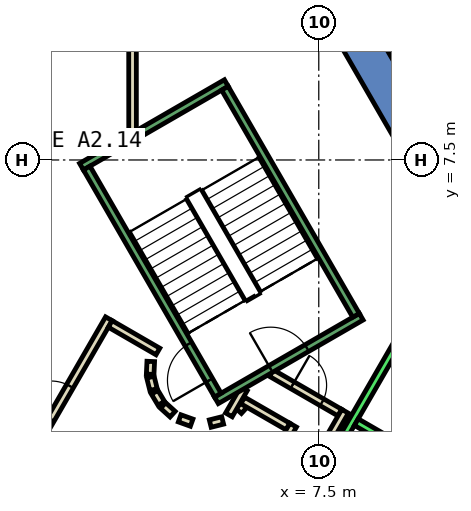
"""IFC4 building model, lengths in metres.
Left out: names, types, materials, properties, quantities, classifications, styles, units other than length and angle.
Written with IfcOpenShell. Run it as: python <this file> out.ifc"""

import sys

from ifc_helpers import new_model, si_unit, direction, frame, frame_2d, origin, place, context, subcontext, project, spatial, polyline, rectangle, outline, extrude, element, fill, save


model = new_model("IFC4")
c1 = context("Model", 3, precision=1e-05, world=origin(), true_north=direction((0.0, 1.0)))
c2 = subcontext(c1, "Body", "Model", "MODEL_VIEW")
j1 = project(units=[si_unit("LENGTHUNIT", "METRE"), si_unit("PLANEANGLEUNIT", "RADIAN")], contexts=[c1])
p1 = place(None, origin())
s1 = spatial("IfcSite", under=j1, at=p1, CompositionType="ELEMENT")
p2 = place(p1, origin())
s2 = spatial("IfcBuilding", under=s1, at=p2, CompositionType="ELEMENT")
p3 = place(p2, frame((0.0, 0.0, 60.2)))
s3 = spatial("IfcBuildingStorey", under=s2, at=p3, CompositionType="ELEMENT", Elevation=60.2)
p4 = place(p3, frame((0.0, 0.0, -0.4)))
e1 = element("IfcWall", 1, at=p4, inside=s3, PredefinedType="SHEAR", context=c2, shape_type="SweptSolid", body=[
    extrude(outline(polyline([(8.517, 11.748), (7.651, 11.248), (12.702, 2.5), (13.856, 2.5), (8.517, 11.748)])), origin(), (0.0, 0.0, 1.0), 4.2),
])
p5 = place(p3, frame((1.88, 7.8, 0.0), z_axis=(0.0, 0.0, 1.0), x_axis=(-1.0, 0.0, 0.0)))
e2 = element("IfcWall", 2, at=p5, inside=s3, PredefinedType="PARTITIONING", context=c2, shape_type="SweptSolid", body=[
    extrude(rectangle(XDim=1.78, YDim=0.2, at=frame_2d((0.89, 0.0))), origin(), (0.0, 0.0, 1.0), 3.8),
])
p6 = place(p3, frame((2.599, 10.7, 0.0), z_axis=(0.0, 0.0, 1.0), x_axis=(0.000393159002, -0.999999922713, 0.0)))
e3 = element("IfcWall", 3, at=p6, inside=s3, PredefinedType="PARTITIONING", context=c2, shape_type="SweptSolid", body=[
    extrude(rectangle(XDim=2.484, YDim=0.2, at=frame_2d((1.242, 0.0))), origin(), (0.0, 0.0, 1.0), 3.8),
])
p7 = place(p3, frame((5.39, 0.898, 0.0), z_axis=(0.0, 0.0, 1.0), x_axis=(0.673828488714, 0.738887791073, 0.0)))
e4 = element("IfcWall", 4, at=p7, inside=s3, PredefinedType="PARTITIONING", context=c2, shape_type="SweptSolid", body=[
    extrude(rectangle(XDim=0.263, YDim=0.2, at=frame_2d((0.131, 0.0))), origin(), (0.0, 0.0, 1.0), 3.8),
])
p8 = place(p3, frame((5.499, 1.172, 0.0), z_axis=(0.0, 0.0, 1.0), x_axis=(0.866333505267, -0.499465972466, 0.0)))
e5 = element("IfcWall", 5, at=p8, inside=s3, PredefinedType="PARTITIONING", context=c2, shape_type="SweptSolid", body=[
    extrude(rectangle(XDim=1.374, YDim=0.2, at=frame_2d((0.687, 0.0))), origin(), (0.0, 0.0, 1.0), 3.8),
])
p9 = place(p3, frame((6.826, 0.522, 0.0), z_axis=(0.0, 0.0, 1.0), x_axis=(-0.500016722714, -0.866015748706, 0.0)))
e6 = element("IfcWall", 6, at=p9, inside=s3, PredefinedType="PARTITIONING", context=c2, shape_type="SweptSolid", body=[
    extrude(rectangle(XDim=1.7, YDim=0.2, at=frame_2d((0.85, 0.0))), origin(), (0.0, 0.0, 1.0), 3.8),
])
p10 = place(p3, frame((6.25, 1.894, 0.0), z_axis=(0.0, 0.0, 1.0), x_axis=(0.866043184279, -0.499969202016, 0.0)))
e7 = element("IfcWall", 7, at=p10, inside=s3, PredefinedType="PARTITIONING", context=c2, shape_type="SweptSolid", body=[
    extrude(rectangle(XDim=2.084, YDim=0.2, at=frame_2d((1.042, 0.0))), origin(), (0.0, 0.0, 1.0), 3.8),
])
p11 = place(p10, frame((0.642, 0.0, 0.0)))
e8 = element("IfcOpeningElement", 8, at=p11, cuts=e7, PredefinedType="OPENING", context=c2, shape_type="SweptSolid", body=[
    extrude(rectangle(XDim=0.9, YDim=2.1, at=frame_2d((0.45, 1.05))), frame((0.0, 0.11, 0.0), z_axis=(0.0, -1.0, 0.0), x_axis=(1.0, 0.0, 0.0)), (0.0, 0.0, 1.0), 0.22),
])
p12 = place(p3, frame((8.192, 0.888, 0.0), z_axis=(0.0, 0.0, 1.0), x_axis=(-0.499940625693, -0.866059680843, 0.0)))
e9 = element("IfcWall", 9, at=p12, inside=s3, PredefinedType="PARTITIONING", context=c2, shape_type="SweptSolid", body=[
    extrude(rectangle(XDim=2.68, YDim=0.2, at=frame_2d((1.34, 0.0))), origin(), (0.0, 0.0, 1.0), 3.8),
])
p13 = place(p3, frame((5.135, 0.793, 0.0), z_axis=(0.0, 0.0, 1.0), x_axis=(0.499526442893, 0.866298639529, 0.0)))
e10 = element("IfcWall", 10, at=p13, inside=s3, PredefinedType="PARTITIONING", context=c2, shape_type="SweptSolid", body=[
    extrude(rectangle(XDim=0.791, YDim=0.2, at=frame_2d((0.396, 0.0))), origin(), (0.0, 0.0, 1.0), 3.8),
])
p14 = place(p3, frame((-0.52, -1.0, 0.0), z_axis=(0.0, 0.0, 1.0), x_axis=(0.50011622646, 0.865958290007, 0.0)))
e11 = element("IfcWall", 11, at=p14, inside=s3, PredefinedType="PARTITIONING", context=c2, shape_type="SweptSolid", body=[
    extrude(rectangle(XDim=4.991, YDim=0.2, at=frame_2d((2.496, 0.0))), origin(), (0.0, 0.0, 1.0), 3.8),
])
p15 = place(p14, frame((1.945, 0.0, 0.0)))
e12 = element("IfcOpeningElement", 12, at=p15, cuts=e11, PredefinedType="OPENING", context=c2, shape_type="SweptSolid", body=[
    extrude(rectangle(XDim=1.0, YDim=2.1, at=frame_2d((0.5, 1.05))), frame((0.0, 0.11, 0.0), z_axis=(0.0, -1.0, 0.0), x_axis=(1.0, 0.0, 0.0)), (0.0, 0.0, 1.0), 0.22),
])
p16 = place(p3, frame((2.012, 3.186, 0.0), z_axis=(0.0, 0.0, 1.0), x_axis=(0.865891012941, -0.500232699559, 0.0)))
e13 = element("IfcWall", 13, at=p16, inside=s3, PredefinedType="PARTITIONING", context=c2, shape_type="SweptSolid", body=[
    extrude(rectangle(XDim=1.449, YDim=0.2, at=frame_2d((0.725, 0.0))), origin(), (0.0, 0.0, 1.0), 3.8),
])
p17 = place(p3, frame((3.079, 2.199, 0.0), z_axis=(0.0, 0.0, 1.0), x_axis=(-0.047771483479, -0.998858290933, 0.0)))
e14 = element("IfcWall", 14, at=p17, inside=s3, PredefinedType="PARTITIONING", context=c2, shape_type="SweptSolid", body=[
    extrude(rectangle(XDim=0.337, YDim=0.2, at=frame_2d((0.169, 0.0))), origin(), (0.0, 0.0, 1.0), 3.8),
])
p18 = place(p3, frame((3.07, 1.786, 0.0), z_axis=(0.0, 0.0, 1.0), x_axis=(0.242705583207, -0.970099994784, 0.0)))
e15 = element("IfcWall", 15, at=p18, inside=s3, PredefinedType="PARTITIONING", context=c2, shape_type="SweptSolid", body=[
    extrude(rectangle(XDim=0.338, YDim=0.2, at=frame_2d((0.169, 0.0))), origin(), (0.0, 0.0, 1.0), 3.8),
])
for number, where, z_axis, x_axis in (
    (16, (3.182, 1.388, 0.0), (0.0, 0.0, 1.0), (0.512, -0.859, 0.0)),
    (17, (3.404, 1.039, 0.0), (0.0, 0.0, 1.0), (0.74, -0.672, 0.0)),
):
    element("IfcWall", number, at=place(p3, frame(where, z_axis=z_axis, x_axis=x_axis)), inside=s3, PredefinedType="PARTITIONING", context=c2, shape_type="SweptSolid", body=[
        extrude(rectangle(XDim=0.338, YDim=0.2, at=frame_2d((0.169, 0.0))), origin(), (0.0, 0.0, 1.0), 3.8),
    ])
p19 = place(p3, frame((3.838, 0.702, 0.0), z_axis=(0.0, 0.0, 1.0), x_axis=(0.941035081519, -0.338308993895, 0.0)))
e18 = element("IfcWall", 18, at=p19, inside=s3, PredefinedType="PARTITIONING", context=c2, shape_type="SweptSolid", body=[
    extrude(rectangle(XDim=0.337, YDim=0.2, at=frame_2d((0.168, 0.0))), origin(), (0.0, 0.0, 1.0), 3.8),
])
p20 = place(p3, frame((4.644, 0.564, 0.0), z_axis=(0.0, 0.0, 1.0), x_axis=(0.969929076366, 0.243387729394, 0.0)))
e19 = element("IfcWall", 19, at=p20, inside=s3, PredefinedType="PARTITIONING", context=c2, shape_type="SweptSolid", body=[
    extrude(rectangle(XDim=0.337, YDim=0.2, at=frame_2d((0.168, 0.0))), origin(), (0.0, 0.0, 1.0), 3.8),
])
p21 = place(p3, frame((4.451, -6.19, 0.0), z_axis=(0.0, 0.0, 1.0), x_axis=(0.50000090737, 0.866024879913, 0.0)))
e20 = element("IfcWall", 20, at=p21, inside=s3, PredefinedType="STANDARD", context=c2, shape_type="SweptSolid", body=[
    extrude(rectangle(XDim=10.6, YDim=0.2, at=frame_2d((5.3, 0.0))), origin(), (0.0, 0.0, 1.0), 3.8),
])
p22 = place(p3, frame((8.488, 0.602, 0.0), z_axis=(0.0, 0.0, 1.0), x_axis=(0.866022959057, -0.500004234368, 0.0)))
e21 = element("IfcWall", 21, at=p22, inside=s3, PredefinedType="STANDARD", context=c2, shape_type="SweptSolid", body=[
    extrude(rectangle(XDim=2.5, YDim=0.2, at=frame_2d((1.25, 0.0))), origin(), (0.0, 0.0, 1.0), 3.8),
])
p23 = place(p3, frame((4.806, 1.176, 0.0), z_axis=(0.0, 0.0, 1.0), x_axis=(0.866059941101, 0.499940174841, 0.0)))
e22 = element("IfcWall", 22, at=p23, inside=s3, PredefinedType="STANDARD", context=c2, shape_type="SweptSolid", body=[
    extrude(rectangle(XDim=4.4, YDim=0.2, at=frame_2d((2.2, 0.0))), origin(), (0.0, 0.0, 1.0), 3.8),
])
p24 = place(p23, frame((1.65, 0.0, 0.0)))
e23 = element("IfcOpeningElement", 23, at=p24, cuts=e22, PredefinedType="OPENING", context=c2, shape_type="SweptSolid", body=[
    extrude(rectangle(XDim=1.1, YDim=2.2, at=frame_2d((0.55, 1.1))), frame((0.0, 0.11, 0.0), z_axis=(0.0, -1.0, 0.0), x_axis=(1.0, 0.0, 0.0)), (0.0, 0.0, 1.0), 0.22),
])
p25 = place(p3, frame((1.256, 7.324, 0.0), z_axis=(0.0, 0.0, 1.0), x_axis=(0.866046073146, 0.499964197906, 0.0)))
e24 = element("IfcWall", 24, at=p25, inside=s3, PredefinedType="STANDARD", context=c2, shape_type="SweptSolid", body=[
    extrude(rectangle(XDim=4.4, YDim=0.2, at=frame_2d((2.2, 0.0))), origin(), (0.0, 0.0, 1.0), 3.8),
])
p26 = place(p3, frame((4.843, 1.312, 0.0), z_axis=(0.0, 0.0, 1.0), x_axis=(-0.499963383562, 0.866046543262, 0.0)))
e25 = element("IfcWall", 25, at=p26, inside=s3, PredefinedType="STANDARD", context=c2, shape_type="SweptSolid", body=[
    extrude(rectangle(XDim=6.9, YDim=0.2, at=frame_2d((3.45, 0.0))), origin(), (0.0, 0.0, 1.0), 3.8),
])
p27 = place(p26, frame((0.45, 0.0, 0.0)))
e26 = element("IfcOpeningElement", 26, at=p27, cuts=e25, PredefinedType="OPENING", context=c2, shape_type="SweptSolid", body=[
    extrude(rectangle(XDim=1.1, YDim=2.2, at=frame_2d((0.55, 1.1))), frame((0.0, 0.11, 0.0), z_axis=(0.0, -1.0, 0.0), x_axis=(1.0, 0.0, 0.0)), (0.0, 0.0, 1.0), 0.22),
])
p28 = place(p3, frame((8.48, 3.412, 0.0), z_axis=(0.0, 0.0, 1.0), x_axis=(-0.499978703459, 0.866037698999, 0.0)))
e27 = element("IfcWall", 27, at=p28, inside=s3, PredefinedType="STANDARD", context=c2, shape_type="SweptSolid", body=[
    extrude(rectangle(XDim=6.9, YDim=0.2, at=frame_2d((3.45, 0.0))), origin(), (0.0, 0.0, 1.0), 3.8),
])
p29 = place(p15, origin())
e28 = element("IfcDoor", 28, at=p29, inside=s3, OperationType="SINGLE_SWING_LEFT", PredefinedType="DOOR", context=c2, shape_type="SweptSolid", body=[
    extrude(rectangle(XDim=1.0, YDim=2.1, at=frame_2d((0.5, 1.05))), frame((0.0, 0.025, 0.0), z_axis=(0.0, -1.0, 0.0), x_axis=(1.0, 0.0, 0.0)), (0.0, 0.0, 1.0), 0.05),
])
fill(e12, e28)
p30 = place(p11, origin())
e29 = element("IfcDoor", 29, at=p30, inside=s3, OperationType="SINGLE_SWING_LEFT", PredefinedType="DOOR", context=c2, shape_type="SweptSolid", body=[
    extrude(rectangle(XDim=0.9, YDim=2.1, at=frame_2d((0.45, 1.05))), frame((0.0, 0.025, 0.0), z_axis=(0.0, -1.0, 0.0), x_axis=(1.0, 0.0, 0.0)), (0.0, 0.0, 1.0), 0.05),
])
fill(e8, e29)
p31 = place(p27, origin())
e30 = element("IfcDoor", 30, at=p31, inside=s3, OperationType="SINGLE_SWING_LEFT", PredefinedType="DOOR", context=c2, shape_type="SweptSolid", body=[
    extrude(rectangle(XDim=1.1, YDim=2.2, at=frame_2d((0.55, 1.1))), frame((0.0, 0.025, 0.0), z_axis=(0.0, -1.0, 0.0), x_axis=(1.0, 0.0, 0.0)), (0.0, 0.0, 1.0), 0.05),
])
fill(e26, e30)
p32 = place(p24, origin())
e31 = element("IfcDoor", 31, at=p32, inside=s3, OperationType="SINGLE_SWING_LEFT", PredefinedType="DOOR", context=c2, shape_type="SweptSolid", body=[
    extrude(rectangle(XDim=1.1, YDim=2.2, at=frame_2d((0.55, 1.1))), frame((0.0, 0.025, 0.0), z_axis=(0.0, -1.0, 0.0), x_axis=(1.0, 0.0, 0.0)), (0.0, 0.0, 1.0), 0.05),
])
fill(e23, e31)
save(model, sys.argv[1])
